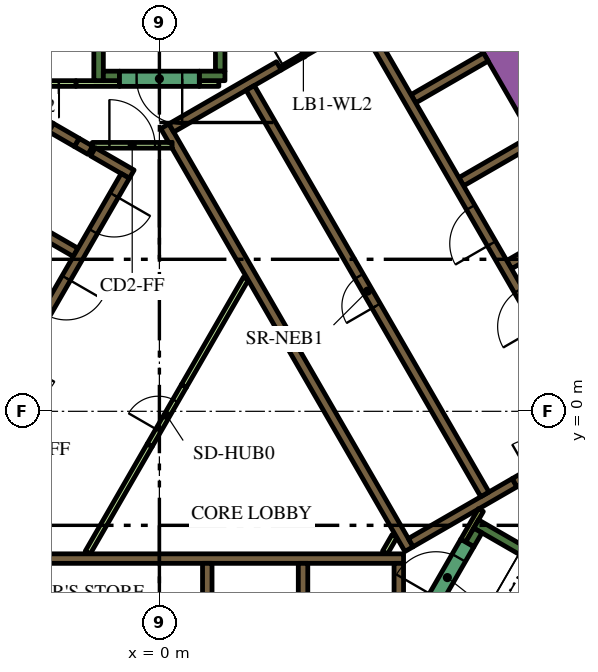
"""IFC4 building model, lengths in metres.
Left out: names, types, materials, properties, quantities, classifications, styles, units other than length and angle.
Written with IfcOpenShell. Run it as: python <this file> out.ifc"""

import sys

from ifc_helpers import new_model, si_unit, direction, frame, frame_2d, origin, place, context, subcontext, project, spatial, polyline, rectangle, outline, extrude, element, fill, save


model = new_model("IFC4")
c1 = context("Model", 3, precision=1e-05, world=origin(), true_north=direction((0.0, 1.0)))
c2 = subcontext(c1, "Body", "Model", "MODEL_VIEW")
j1 = project(units=[si_unit("LENGTHUNIT", "METRE"), si_unit("PLANEANGLEUNIT", "RADIAN")], contexts=[c1])
p1 = place(None, origin())
s1 = spatial("IfcSite", under=j1, at=p1, CompositionType="ELEMENT")
p2 = place(p1, origin())
s2 = spatial("IfcBuilding", under=s1, at=p2, CompositionType="ELEMENT")
p3 = place(p2, frame((0.0, 0.0, 78.3)))
s3 = spatial("IfcBuildingStorey", under=s2, at=p3, CompositionType="ELEMENT", Elevation=78.3)
p4 = place(p3, frame((6.776, 13.364, 0.0), z_axis=(0.0, 0.0, 1.0), x_axis=(0.500004177138, -0.8660229921, 0.0)))
e1 = element("IfcWall", 1, at=p4, inside=s3, PredefinedType="SOLIDWALL", context=c2, shape_type="SweptSolid", body=[
    extrude(rectangle(XDim=20.204, YDim=0.9, at=frame_2d((10.102, 0.0))), origin(), (0.0, 0.0, 1.0), 5.4),
])
p5 = place(p3, frame((8.334, -2.964, 0.0), z_axis=(0.0, 0.0, 1.0), x_axis=(0.866016039709, -0.500016218704, 0.0)))
e2 = element("IfcWall", 2, at=p5, inside=s3, PredefinedType="SOLIDWALL", context=c2, shape_type="SweptSolid", body=[
    extrude(rectangle(XDim=7.05, YDim=0.25, at=frame_2d((3.525, 0.0))), origin(), (0.0, 0.0, 1.0), 5.4),
])
p6 = place(p3, frame((8.168, -3.503, 0.0), z_axis=(0.0, 0.0, 1.0), x_axis=(0.49972245349, 0.866185586049, 0.0)))
e3 = element("IfcWall", 3, at=p6, inside=s3, PredefinedType="SOLIDWALL", context=c2, shape_type="SweptSolid", body=[
    extrude(rectangle(XDim=0.425, YDim=0.25, at=frame_2d((0.212, 0.0))), origin(), (0.0, 0.0, 1.0), 5.4),
])
p7 = place(p3, frame((1.6, 8.95, 0.0), z_axis=(0.0, 0.0, 1.0), x_axis=(0.0, 1.0, 0.0)))
e4 = element("IfcWall", 4, at=p7, inside=s3, PredefinedType="SOLIDWALL", context=c2, shape_type="SweptSolid", body=[
    extrude(rectangle(XDim=6.8, YDim=0.25, at=frame_2d((3.4, 0.0))), origin(), (0.0, 0.0, 1.0), 5.4),
])
p8 = place(p3, frame((1.05, 8.825, 0.0), z_axis=(0.0, 0.0, 1.0), x_axis=(1.0, 0.0, 0.0)))
e5 = element("IfcWall", 5, at=p8, inside=s3, PredefinedType="SOLIDWALL", context=c2, shape_type="SweptSolid", body=[
    extrude(rectangle(XDim=0.675, YDim=0.25, at=frame_2d((0.337, 0.0))), origin(), (0.0, 0.0, 1.0), 5.4),
])
p9 = place(p3, frame((-1.6, 8.7, 0.0), z_axis=(0.0, 0.0, 1.0), x_axis=(0.0, 1.0, 0.0)))
e6 = element("IfcWall", 6, at=p9, inside=s3, PredefinedType="SOLIDWALL", context=c2, shape_type="SweptSolid", body=[
    extrude(rectangle(XDim=7.05, YDim=0.25, at=frame_2d((3.525, 0.0))), origin(), (0.0, 0.0, 1.0), 5.4),
])
p10 = place(p3, frame((-1.475, 8.825, 0.0), z_axis=(0.0, 0.0, 1.0), x_axis=(1.0, 0.0, 0.0)))
e7 = element("IfcWall", 7, at=p10, inside=s3, PredefinedType="SOLIDWALL", context=c2, shape_type="SweptSolid", body=[
    extrude(rectangle(XDim=0.425, YDim=0.25, at=frame_2d((0.212, 0.0))), origin(), (0.0, 0.0, 1.0), 5.4),
])
p11 = place(p3, frame((-5.845, -3.875, 0.0), z_axis=(0.0, 0.0, 1.0), x_axis=(1.0, 0.0, 0.0)))
e8 = element("IfcWall", 8, at=p11, inside=s3, PredefinedType="SOLIDWALL", context=c2, shape_type="SweptSolid", body=[
    extrude(rectangle(XDim=12.27, YDim=0.25, at=frame_2d((6.135, 0.0))), origin(), (0.0, 0.0, 1.0), 5.4),
])
p12 = place(p3, frame((6.3, -7.268, 0.0), z_axis=(0.0, 0.0, 1.0), x_axis=(0.0, 1.0, 0.0)))
e9 = element("IfcWall", 9, at=p12, inside=s3, PredefinedType="SOLIDWALL", context=c2, shape_type="SweptSolid", body=[
    extrude(rectangle(XDim=3.268, YDim=0.25, at=frame_2d((1.634, 0.0))), origin(), (0.0, 0.0, 1.0), 5.4),
])
for number, where, z_axis, x_axis in (
    (10, (3.78, -4.0, 0.0), (0.0, 0.0, 1.0), (0.0, -1.0, 0.0)),
    (11, (1.26, -4.0, 0.0), (0.0, 0.0, 1.0), (0.0, -1.0, 0.0)),
):
    element("IfcWall", number, at=place(p3, frame(where, z_axis=z_axis, x_axis=x_axis)), inside=s3, PredefinedType="SOLIDWALL", context=c2, shape_type="SweptSolid", body=[
        extrude(rectangle(XDim=2.2, YDim=0.25, at=frame_2d((1.1, 0.0))), origin(), (0.0, 0.0, 1.0), 5.4),
    ])
p13 = place(p3, origin())
e12 = element("IfcWall", 12, at=p13, inside=s3, PredefinedType="SOLIDWALL", context=c2, shape_type="SweptSolid", body=[
    extrude(outline(polyline([(0.335, 6.925), (0.335, 7.075), (0.335, 7.075), (0.335, 7.075), (0.245, 7.075), (0.079, 7.363), (0.035, 7.439), (0.252, 7.564), (0.377, 7.348), (6.552, -3.348), (6.677, -3.564), (6.46, -3.689), (4.897, -0.981), (0.332, 6.925), (0.335, 6.925), (0.335, 6.925), (0.335, 6.925)])), origin(), (0.0, 0.0, 1.0), 5.4),
])
p14 = place(p3, frame((0.314, 7.456, 0.0), z_axis=(0.0, 0.0, 1.0), x_axis=(0.866013897511, 0.50001992892, 0.0)))
e13 = element("IfcWall", 13, at=p14, inside=s3, PredefinedType="SOLIDWALL", context=c2, shape_type="SweptSolid", body=[
    extrude(rectangle(XDim=3.268, YDim=0.25, at=frame_2d((1.634, 0.0))), origin(), (0.0, 0.0, 1.0), 5.4),
])
p15 = place(p3, frame((6.614, -3.456, 0.0), z_axis=(0.0, 0.0, 1.0), x_axis=(0.86602447079, 0.500001615989, 0.0)))
e14 = element("IfcWall", 14, at=p15, inside=s3, PredefinedType="SOLIDWALL", context=c2, shape_type="SweptSolid", body=[
    extrude(rectangle(XDim=3.154, YDim=0.25, at=frame_2d((1.577, 0.0))), origin(), (0.0, 0.0, 1.0), 5.4),
])
for number, where, z_axis, x_axis in (
    (15, (6.684, 8.224, 0.0), (0.0, 0.0, 1.0), (0.866, 0.5, 0.0)),
    (16, (7.944, 6.041, 0.0), (0.0, 0.0, 1.0), (0.866, 0.5, 0.0)),
    (17, (9.204, 3.859, 0.0), (0.0, 0.0, 1.0), (0.866, 0.5, 0.0)),
):
    element("IfcWall", number, at=place(p3, frame(where, z_axis=z_axis, x_axis=x_axis)), inside=s3, PredefinedType="SOLIDWALL", context=c2, shape_type="SweptSolid", body=[
        extrude(rectangle(XDim=2.2, YDim=0.25, at=frame_2d((1.1, 0.0))), origin(), (0.0, 0.0, 1.0), 5.4),
    ])
p16 = place(p3, frame((-8.06, -1.311, 0.0), z_axis=(0.0, 0.0, 1.0), x_axis=(0.50000273126, 0.866023826885, 0.0)))
e18 = element("IfcWall", 18, at=p16, inside=s3, PredefinedType="SOLIDWALL", context=c2, shape_type="SweptSolid", body=[
    extrude(rectangle(XDim=10.33, YDim=0.25, at=frame_2d((5.165, 0.0))), origin(), (0.0, 0.0, 1.0), 5.4),
])
p17 = place(p3, frame((-1.819, 6.87, 0.0), z_axis=(0.0, 0.0, 1.0), x_axis=(-0.866294599386, 0.499533449405, 0.0)))
e19 = element("IfcWall", 19, at=p17, inside=s3, PredefinedType="SOLIDWALL", context=c2, shape_type="SweptSolid", body=[
    extrude(rectangle(XDim=0.41, YDim=0.25, at=frame_2d((0.205, 0.0))), origin(), (0.0, 0.0, 1.0), 5.4),
])
p18 = place(p3, frame((-2.849, 7.465, 0.0), z_axis=(0.0, 0.0, 1.0), x_axis=(0.865955664968, -0.500120771724, 0.0)))
e20 = element("IfcWall", 20, at=p18, inside=s3, PredefinedType="SOLIDWALL", context=c2, shape_type="SweptSolid", body=[
    extrude(rectangle(XDim=0.778, YDim=0.25, at=frame_2d((0.389, 0.0))), origin(), (0.0, 0.0, 1.0), 5.4),
])
p19 = place(p3, frame((-0.728, 6.24, 0.0), z_axis=(0.0, 0.0, 1.0), x_axis=(-0.866002680491, 0.500039355833, 0.0)))
e21 = element("IfcWall", 21, at=p19, inside=s3, PredefinedType="SOLIDWALL", context=c2, shape_type="SweptSolid", body=[
    extrude(rectangle(XDim=1.178, YDim=0.25, at=frame_2d((0.589, 0.0))), origin(), (0.0, 0.0, 1.0), 5.4),
])
p20 = place(p3, frame((-2.204, 4.182, 0.0), z_axis=(0.0, 0.0, 1.0), x_axis=(-0.866008176907, 0.50002983664, 0.0)))
e22 = element("IfcWall", 22, at=p20, inside=s3, PredefinedType="SOLIDWALL", context=c2, shape_type="SweptSolid", body=[
    extrude(rectangle(XDim=2.2, YDim=0.25, at=frame_2d((1.1, 0.0))), origin(), (0.0, 0.0, 1.0), 5.4),
])
p21 = place(p3, frame((5.936, -3.718, 0.0), z_axis=(0.0, 0.0, 1.0), x_axis=(0.499890179513, 0.866088799389, 0.0)))
e23 = element("IfcWall", 23, at=p21, inside=s3, PredefinedType="PARTITIONING", context=c2, shape_type="SweptSolid", body=[
    extrude(rectangle(XDim=0.504, YDim=0.15, at=frame_2d((0.252, 0.0))), origin(), (0.0, 0.0, 1.0), 4.25),
])
p22 = place(p3, frame((8.459, -2.599, 0.0), z_axis=(0.0, 0.0, 1.0), x_axis=(-0.500041054325, -0.866001699761, 0.0)))
e24 = element("IfcWall", 24, at=p22, inside=s3, PredefinedType="PARTITIONING", context=c2, shape_type="SweptSolid", body=[
    extrude(rectangle(XDim=0.929, YDim=0.15, at=frame_2d((0.464, 0.0))), origin(), (0.0, 0.0, 1.0), 5.4),
])
for number, where, z_axis, x_axis in (
    (25, (-1.887, -3.718, 0.0), (0.0, 0.0, 1.0), (0.5, 0.866, 0.0)),
    (26, (0.645, 0.667, 0.0), (0.0, 0.0, 1.0), (0.5, 0.866, 0.0)),
):
    element("IfcWall", number, at=place(p3, frame(where, z_axis=z_axis, x_axis=x_axis)), inside=s3, PredefinedType="PARTITIONING", context=c2, shape_type="SweptSolid", body=[
        extrude(rectangle(XDim=3.263, YDim=0.15, at=frame_2d((1.632, 0.0))), origin(), (0.0, 0.0, 1.0), 4.25),
    ])
p23 = place(p3, frame((-2.196, 8.625, 0.0), z_axis=(0.0, 0.0, 1.0), x_axis=(1.0, 0.0, 0.0)))
e27 = element("IfcWall", 27, at=p23, inside=s3, PredefinedType="PARTITIONING", context=c2, shape_type="SweptSolid", body=[
    extrude(rectangle(XDim=1.146, YDim=0.15, at=frame_2d((0.573, 0.0))), origin(), (0.0, 0.0, 1.0), 4.25),
])
p24 = place(p3, frame((1.05, 8.625, 0.0), z_axis=(0.0, 0.0, 1.0), x_axis=(1.0, 0.0, 0.0)))
e28 = element("IfcWall", 28, at=p24, inside=s3, PredefinedType="PARTITIONING", context=c2, shape_type="SweptSolid", body=[
    extrude(rectangle(XDim=0.514, YDim=0.15, at=frame_2d((0.257, 0.0))), origin(), (0.0, 0.0, 1.0), 4.25),
])
p25 = place(p3, frame((11.553, -0.46, 0.0), z_axis=(0.0, 0.0, 1.0), x_axis=(-0.500006514828, 0.866021642414, 0.0)))
e29 = element("IfcWall", 29, at=p25, inside=s3, PredefinedType="SOLIDWALL", context=c2, shape_type="SweptSolid", body=[
    extrude(rectangle(XDim=12.35, YDim=0.25, at=frame_2d((6.175, 0.0))), origin(), (0.0, 0.0, 1.0), 5.4),
])
p26 = place(p25, frame((0.585, 0.0, 0.0)))
e30 = element("IfcOpeningElement", 30, at=p26, cuts=e29, PredefinedType="OPENING", context=c2, shape_type="SweptSolid", body=[
    extrude(rectangle(XDim=1.1, YDim=2.1, at=frame_2d((0.55, 1.05))), frame((0.0, 0.135, 0.0), z_axis=(0.0, -1.0, 0.0), x_axis=(1.0, 0.0, 0.0)), (0.0, 0.0, 1.0), 0.27),
])
p27 = place(p25, frame((3.105, 0.0, 0.0)))
e31 = element("IfcOpeningElement", 31, at=p27, cuts=e29, PredefinedType="OPENING", context=c2, shape_type="SweptSolid", body=[
    extrude(rectangle(XDim=1.1, YDim=2.1, at=frame_2d((0.55, 1.05))), frame((0.0, 0.135, 0.0), z_axis=(0.0, -1.0, 0.0), x_axis=(1.0, 0.0, 0.0)), (0.0, 0.0, 1.0), 0.27),
])
p28 = place(p25, frame((5.625, 0.0, 0.0)))
e32 = element("IfcOpeningElement", 32, at=p28, cuts=e29, PredefinedType="OPENING", context=c2, shape_type="SweptSolid", body=[
    extrude(rectangle(XDim=1.1, YDim=2.1, at=frame_2d((0.55, 1.05))), frame((0.0, 0.135, 0.0), z_axis=(0.0, -1.0, 0.0), x_axis=(1.0, 0.0, 0.0)), (0.0, 0.0, 1.0), 0.27),
])
p29 = place(p3, frame((8.565, -2.185, 0.0), z_axis=(0.0, 0.0, 1.0), x_axis=(-0.499997954832, 0.866026584559, 0.0)))
e33 = element("IfcWall", 33, at=p29, inside=s3, PredefinedType="SOLIDWALL", context=c2, shape_type="SweptSolid", body=[
    extrude(rectangle(XDim=12.35, YDim=0.25, at=frame_2d((6.175, 0.0))), origin(), (0.0, 0.0, 1.0), 5.4),
])
p30 = place(p29, frame((5.725, 0.0, 0.0)))
e34 = element("IfcOpeningElement", 34, at=p30, cuts=e33, PredefinedType="OPENING", context=c2, shape_type="SweptSolid", body=[
    extrude(rectangle(XDim=0.9, YDim=2.1, at=frame_2d((0.45, 1.05))), frame((0.0, 0.135, 0.0), z_axis=(0.0, -1.0, 0.0), x_axis=(1.0, 0.0, 0.0)), (0.0, 0.0, 1.0), 0.27),
])
p31 = place(p3, frame((-0.898, 6.194, 0.0), z_axis=(0.0, 0.0, 1.0), x_axis=(-0.499996202215, -0.866027596426, 0.0)))
e35 = element("IfcWall", 35, at=p31, inside=s3, PredefinedType="SOLIDWALL", context=c2, shape_type="SweptSolid", body=[
    extrude(rectangle(XDim=9.83, YDim=0.25, at=frame_2d((4.915, 0.0))), origin(), (0.0, 0.0, 1.0), 5.4),
])
p32 = place(p31, frame((0.585, 0.0, 0.0)))
e36 = element("IfcOpeningElement", 36, at=p32, cuts=e35, PredefinedType="OPENING", context=c2, shape_type="SweptSolid", body=[
    extrude(rectangle(XDim=1.1, YDim=2.1, at=frame_2d((0.55, 1.05))), frame((0.0, 0.135, 0.0), z_axis=(0.0, -1.0, 0.0), x_axis=(1.0, 0.0, 0.0)), (0.0, 0.0, 1.0), 0.27),
])
p33 = place(p31, frame((3.105, 0.0, 0.0)))
e37 = element("IfcOpeningElement", 37, at=p33, cuts=e35, PredefinedType="OPENING", context=c2, shape_type="SweptSolid", body=[
    extrude(rectangle(XDim=1.1, YDim=2.1, at=frame_2d((0.55, 1.05))), frame((0.0, 0.135, 0.0), z_axis=(0.0, -1.0, 0.0), x_axis=(1.0, 0.0, 0.0)), (0.0, 0.0, 1.0), 0.27),
])
p34 = place(p31, frame((5.625, 0.0, 0.0)))
e38 = element("IfcOpeningElement", 38, at=p34, cuts=e35, PredefinedType="OPENING", context=c2, shape_type="SweptSolid", body=[
    extrude(rectangle(XDim=1.1, YDim=2.1, at=frame_2d((0.55, 1.05))), frame((0.0, 0.135, 0.0), z_axis=(0.0, -1.0, 0.0), x_axis=(1.0, 0.0, 0.0)), (0.0, 0.0, 1.0), 0.27),
])
p35 = place(p31, frame((8.145, 0.0, 0.0)))
e39 = element("IfcOpeningElement", 39, at=p35, cuts=e35, PredefinedType="OPENING", context=c2, shape_type="SweptSolid", body=[
    extrude(rectangle(XDim=1.1, YDim=2.1, at=frame_2d((0.55, 1.05))), frame((0.0, 0.135, 0.0), z_axis=(0.0, -1.0, 0.0), x_axis=(1.0, 0.0, 0.0)), (0.0, 0.0, 1.0), 0.27),
])
p36 = place(p3, frame((7.053, -5.284, 0.0), z_axis=(0.0, 0.0, 1.0), x_axis=(0.500078061341, 0.865980330357, 0.0)))
e40 = element("IfcWall", 40, at=p36, inside=s3, PredefinedType="SOLIDWALL", context=c2, shape_type="SweptSolid", body=[
    extrude(rectangle(XDim=2.1, YDim=0.4, at=frame_2d((1.05, 0.0))), origin(), (0.0, 0.0, 1.0), 5.4),
])
p37 = place(p36, frame((0.45, 0.0, 0.0)))
e41 = element("IfcOpeningElement", 41, at=p37, cuts=e40, PredefinedType="OPENING", context=c2, shape_type="SweptSolid", body=[
    extrude(rectangle(XDim=1.2, YDim=2.1, at=frame_2d((0.6, 1.05))), frame((0.0, 0.21, 0.0), z_axis=(0.0, -1.0, 0.0), x_axis=(1.0, 0.0, 0.0)), (0.0, 0.0, 1.0), 0.42),
])
p38 = place(p3, frame((9.346, -1.879, 0.0), z_axis=(0.0, 0.0, 1.0), x_axis=(0.866047807691, 0.499961193289, 0.0)))
e42 = element("IfcWall", 42, at=p38, inside=s3, PredefinedType="SOLIDWALL", context=c2, shape_type="SweptSolid", body=[
    extrude(rectangle(XDim=1.8, YDim=0.25, at=frame_2d((0.9, 0.0))), origin(), (0.0, 0.0, 1.0), 5.4),
])
p39 = place(p38, frame((0.45, 0.0, 0.0)))
e43 = element("IfcOpeningElement", 43, at=p39, cuts=e42, PredefinedType="OPENING", context=c2, shape_type="SweptSolid", body=[
    extrude(rectangle(XDim=0.9, YDim=2.1, at=frame_2d((0.45, 1.05))), frame((0.0, 0.135, 0.0), z_axis=(0.0, -1.0, 0.0), x_axis=(1.0, 0.0, 0.0)), (0.0, 0.0, 1.0), 0.27),
])
p40 = place(p3, frame((1.05, 8.75, 0.0), z_axis=(0.0, 0.0, 1.0), x_axis=(-1.0, 0.0, 0.0)))
e44 = element("IfcWall", 44, at=p40, inside=s3, PredefinedType="SOLIDWALL", context=c2, shape_type="SweptSolid", body=[
    extrude(rectangle(XDim=2.1, YDim=0.4, at=frame_2d((1.05, 0.0))), origin(), (0.0, 0.0, 1.0), 5.4),
])
p41 = place(p40, frame((0.45, 0.0, 0.0)))
e45 = element("IfcOpeningElement", 45, at=p41, cuts=e44, PredefinedType="OPENING", context=c2, shape_type="SweptSolid", body=[
    extrude(rectangle(XDim=1.2, YDim=2.1, at=frame_2d((0.6, 1.05))), frame((0.0, 0.21, 0.0), z_axis=(0.0, -1.0, 0.0), x_axis=(1.0, 0.0, 0.0)), (0.0, 0.0, 1.0), 0.42),
])
p42 = place(p3, frame((-2.196, 8.625, 0.0), z_axis=(0.0, 0.0, 1.0), x_axis=(-1.0, 0.0, 0.0)))
e46 = element("IfcWall", 46, at=p42, inside=s3, PredefinedType="PARTITIONING", context=c2, shape_type="SweptSolid", body=[
    extrude(rectangle(XDim=1.8, YDim=0.15, at=frame_2d((0.9, 0.0))), origin(), (0.0, 0.0, 1.0), 4.25),
])
p43 = place(p42, frame((0.45, 0.0, 0.0)))
e47 = element("IfcOpeningElement", 47, at=p43, cuts=e46, PredefinedType="OPENING", context=c2, shape_type="SweptSolid", body=[
    extrude(rectangle(XDim=0.9, YDim=2.1, at=frame_2d((0.45, 1.05))), frame((0.0, 0.085, 0.0), z_axis=(0.0, -1.0, 0.0), x_axis=(1.0, 0.0, 0.0)), (0.0, 0.0, 1.0), 0.17),
])
p44 = place(p3, frame((-1.765, 7.0, 0.0), z_axis=(0.0, 0.0, 1.0), x_axis=(1.0, 0.0, 0.0)))
e48 = element("IfcWall", 48, at=p44, inside=s3, PredefinedType="PARTITIONING", context=c2, shape_type="SweptSolid", body=[
    extrude(rectangle(XDim=2.1, YDim=0.15, at=frame_2d((1.05, 0.0))), origin(), (0.0, 0.0, 1.0), 4.25),
])
p45 = place(p44, frame((0.45, 0.0, 0.0)))
e49 = element("IfcOpeningElement", 49, at=p45, cuts=e48, PredefinedType="OPENING", context=c2, shape_type="SweptSolid", body=[
    extrude(rectangle(XDim=1.2, YDim=2.1, at=frame_2d((0.6, 1.05))), frame((0.0, 0.085, 0.0), z_axis=(0.0, -1.0, 0.0), x_axis=(1.0, 0.0, 0.0)), (0.0, 0.0, 1.0), 0.17),
])
p46 = place(p3, frame((3.183, 9.02, 0.0), z_axis=(0.0, 0.0, 1.0), x_axis=(0.866034573852, 0.49998411664, 0.0)))
e50 = element("IfcWall", 50, at=p46, inside=s3, PredefinedType="PARTITIONING", context=c2, shape_type="SweptSolid", body=[
    extrude(rectangle(XDim=1.4, YDim=0.09, at=frame_2d((0.7, 0.0))), origin(), (0.0, 0.0, 1.0), 4.25),
])
p47 = place(p46, frame((0.1, 0.0, 0.0)))
e51 = element("IfcOpeningElement", 51, at=p47, cuts=e50, PredefinedType="OPENING", context=c2, shape_type="SweptSolid", body=[
    extrude(rectangle(XDim=1.2, YDim=2.1, at=frame_2d((0.6, 1.05))), frame((0.0, 0.055, 0.0), z_axis=(0.0, -1.0, 0.0), x_axis=(1.0, 0.0, 0.0)), (0.0, 0.0, 1.0), 0.11),
])
p48 = place(p3, frame((-0.255, -0.892, 0.0), z_axis=(0.0, 0.0, 1.0), x_axis=(0.500062916607, 0.865989075817, 0.0)))
e52 = element("IfcWall", 52, at=p48, inside=s3, PredefinedType="PARTITIONING", context=c2, shape_type="SweptSolid", body=[
    extrude(rectangle(XDim=1.8, YDim=0.15, at=frame_2d((0.9, 0.0))), origin(), (0.0, 0.0, 1.0), 4.25),
])
p49 = place(p48, frame((0.45, 0.0, 0.0)))
e53 = element("IfcOpeningElement", 53, at=p49, cuts=e52, PredefinedType="OPENING", context=c2, shape_type="SweptSolid", body=[
    extrude(rectangle(XDim=0.9, YDim=2.1, at=frame_2d((0.45, 1.05))), frame((0.0, 0.085, 0.0), z_axis=(0.0, -1.0, 0.0), x_axis=(1.0, 0.0, 0.0)), (0.0, 0.0, 1.0), 0.17),
])
p50 = place(p27, origin())
e54 = element("IfcDoor", 54, at=p50, inside=s3, OperationType="DOUBLE_DOOR_SLIDING", PredefinedType="DOOR", context=c2, shape_type="SweptSolid", body=[
    extrude(rectangle(XDim=1.1, YDim=2.1, at=frame_2d((0.55, 1.05))), frame((0.0, 0.025, 0.0), z_axis=(0.0, -1.0, 0.0), x_axis=(1.0, 0.0, 0.0)), (0.0, 0.0, 1.0), 0.05),
])
fill(e31, e54)
p51 = place(p28, origin())
e55 = element("IfcDoor", 55, at=p51, inside=s3, OperationType="DOUBLE_DOOR_SLIDING", PredefinedType="DOOR", context=c2, shape_type="SweptSolid", body=[
    extrude(rectangle(XDim=1.1, YDim=2.1, at=frame_2d((0.55, 1.05))), frame((0.0, 0.025, 0.0), z_axis=(0.0, -1.0, 0.0), x_axis=(1.0, 0.0, 0.0)), (0.0, 0.0, 1.0), 0.05),
])
fill(e32, e55)
p52 = place(p30, origin())
e56 = element("IfcDoor", 56, at=p52, inside=s3, OperationType="SINGLE_SWING_LEFT", PredefinedType="DOOR", context=c2, shape_type="SweptSolid", body=[
    extrude(rectangle(XDim=0.9, YDim=2.1, at=frame_2d((0.45, 1.05))), frame((0.0, 0.025, 0.0), z_axis=(0.0, -1.0, 0.0), x_axis=(1.0, 0.0, 0.0)), (0.0, 0.0, 1.0), 0.05),
])
fill(e34, e56)
p53 = place(p32, origin())
e57 = element("IfcDoor", 57, at=p53, inside=s3, OperationType="DOUBLE_DOOR_SLIDING", PredefinedType="DOOR", context=c2, shape_type="SweptSolid", body=[
    extrude(rectangle(XDim=1.1, YDim=2.1, at=frame_2d((0.55, 1.05))), frame((0.0, 0.025, 0.0), z_axis=(0.0, -1.0, 0.0), x_axis=(1.0, 0.0, 0.0)), (0.0, 0.0, 1.0), 0.05),
])
fill(e36, e57)
p54 = place(p33, origin())
e58 = element("IfcDoor", 58, at=p54, inside=s3, OperationType="DOUBLE_DOOR_SLIDING", PredefinedType="DOOR", context=c2, shape_type="SweptSolid", body=[
    extrude(rectangle(XDim=1.1, YDim=2.1, at=frame_2d((0.55, 1.05))), frame((0.0, 0.025, 0.0), z_axis=(0.0, -1.0, 0.0), x_axis=(1.0, 0.0, 0.0)), (0.0, 0.0, 1.0), 0.05),
])
fill(e37, e58)
p55 = place(p37, origin())
e59 = element("IfcDoor", 59, at=p55, inside=s3, OperationType="SINGLE_SWING_LEFT", PredefinedType="DOOR", context=c2, shape_type="SweptSolid", body=[
    extrude(rectangle(XDim=1.2, YDim=2.1, at=frame_2d((0.6, 1.05))), frame((0.0, 0.025, 0.0), z_axis=(0.0, -1.0, 0.0), x_axis=(1.0, 0.0, 0.0)), (0.0, 0.0, 1.0), 0.05),
])
fill(e41, e59)
p56 = place(p41, origin())
e60 = element("IfcDoor", 60, at=p56, inside=s3, OperationType="SINGLE_SWING_LEFT", PredefinedType="DOOR", context=c2, shape_type="SweptSolid", body=[
    extrude(rectangle(XDim=1.2, YDim=2.1, at=frame_2d((0.6, 1.05))), frame((0.0, 0.025, 0.0), z_axis=(0.0, -1.0, 0.0), x_axis=(1.0, 0.0, 0.0)), (0.0, 0.0, 1.0), 0.05),
])
fill(e45, e60)
p57 = place(p43, origin())
e61 = element("IfcDoor", 61, at=p57, inside=s3, OperationType="SINGLE_SWING_LEFT", PredefinedType="DOOR", context=c2, shape_type="SweptSolid", body=[
    extrude(rectangle(XDim=0.9, YDim=2.1, at=frame_2d((0.45, 1.05))), frame((0.0, 0.025, 0.0), z_axis=(0.0, -1.0, 0.0), x_axis=(1.0, 0.0, 0.0)), (0.0, 0.0, 1.0), 0.05),
])
fill(e47, e61)
p58 = place(p45, origin())
e62 = element("IfcDoor", 62, at=p58, inside=s3, OperationType="SINGLE_SWING_LEFT", PredefinedType="DOOR", context=c2, shape_type="SweptSolid", body=[
    extrude(rectangle(XDim=1.2, YDim=2.1, at=frame_2d((0.6, 1.05))), frame((0.0, 0.025, 0.0), z_axis=(0.0, -1.0, 0.0), x_axis=(1.0, 0.0, 0.0)), (0.0, 0.0, 1.0), 0.05),
])
fill(e49, e62)
p59 = place(p47, origin())
e63 = element("IfcDoor", 63, at=p59, inside=s3, OperationType="SINGLE_SWING_LEFT", PredefinedType="DOOR", context=c2, shape_type="SweptSolid", body=[
    extrude(rectangle(XDim=1.2, YDim=2.1, at=frame_2d((0.6, 1.05))), frame((0.0, 0.025, 0.0), z_axis=(0.0, -1.0, 0.0), x_axis=(1.0, 0.0, 0.0)), (0.0, 0.0, 1.0), 0.05),
])
fill(e51, e63)
p60 = place(p49, origin())
e64 = element("IfcDoor", 64, at=p60, inside=s3, OperationType="SINGLE_SWING_LEFT", PredefinedType="DOOR", context=c2, shape_type="SweptSolid", body=[
    extrude(rectangle(XDim=0.9, YDim=2.1, at=frame_2d((0.45, 1.05))), frame((0.0, 0.025, 0.0), z_axis=(0.0, -1.0, 0.0), x_axis=(1.0, 0.0, 0.0)), (0.0, 0.0, 1.0), 0.05),
])
fill(e53, e64)
save(model, sys.argv[1])
